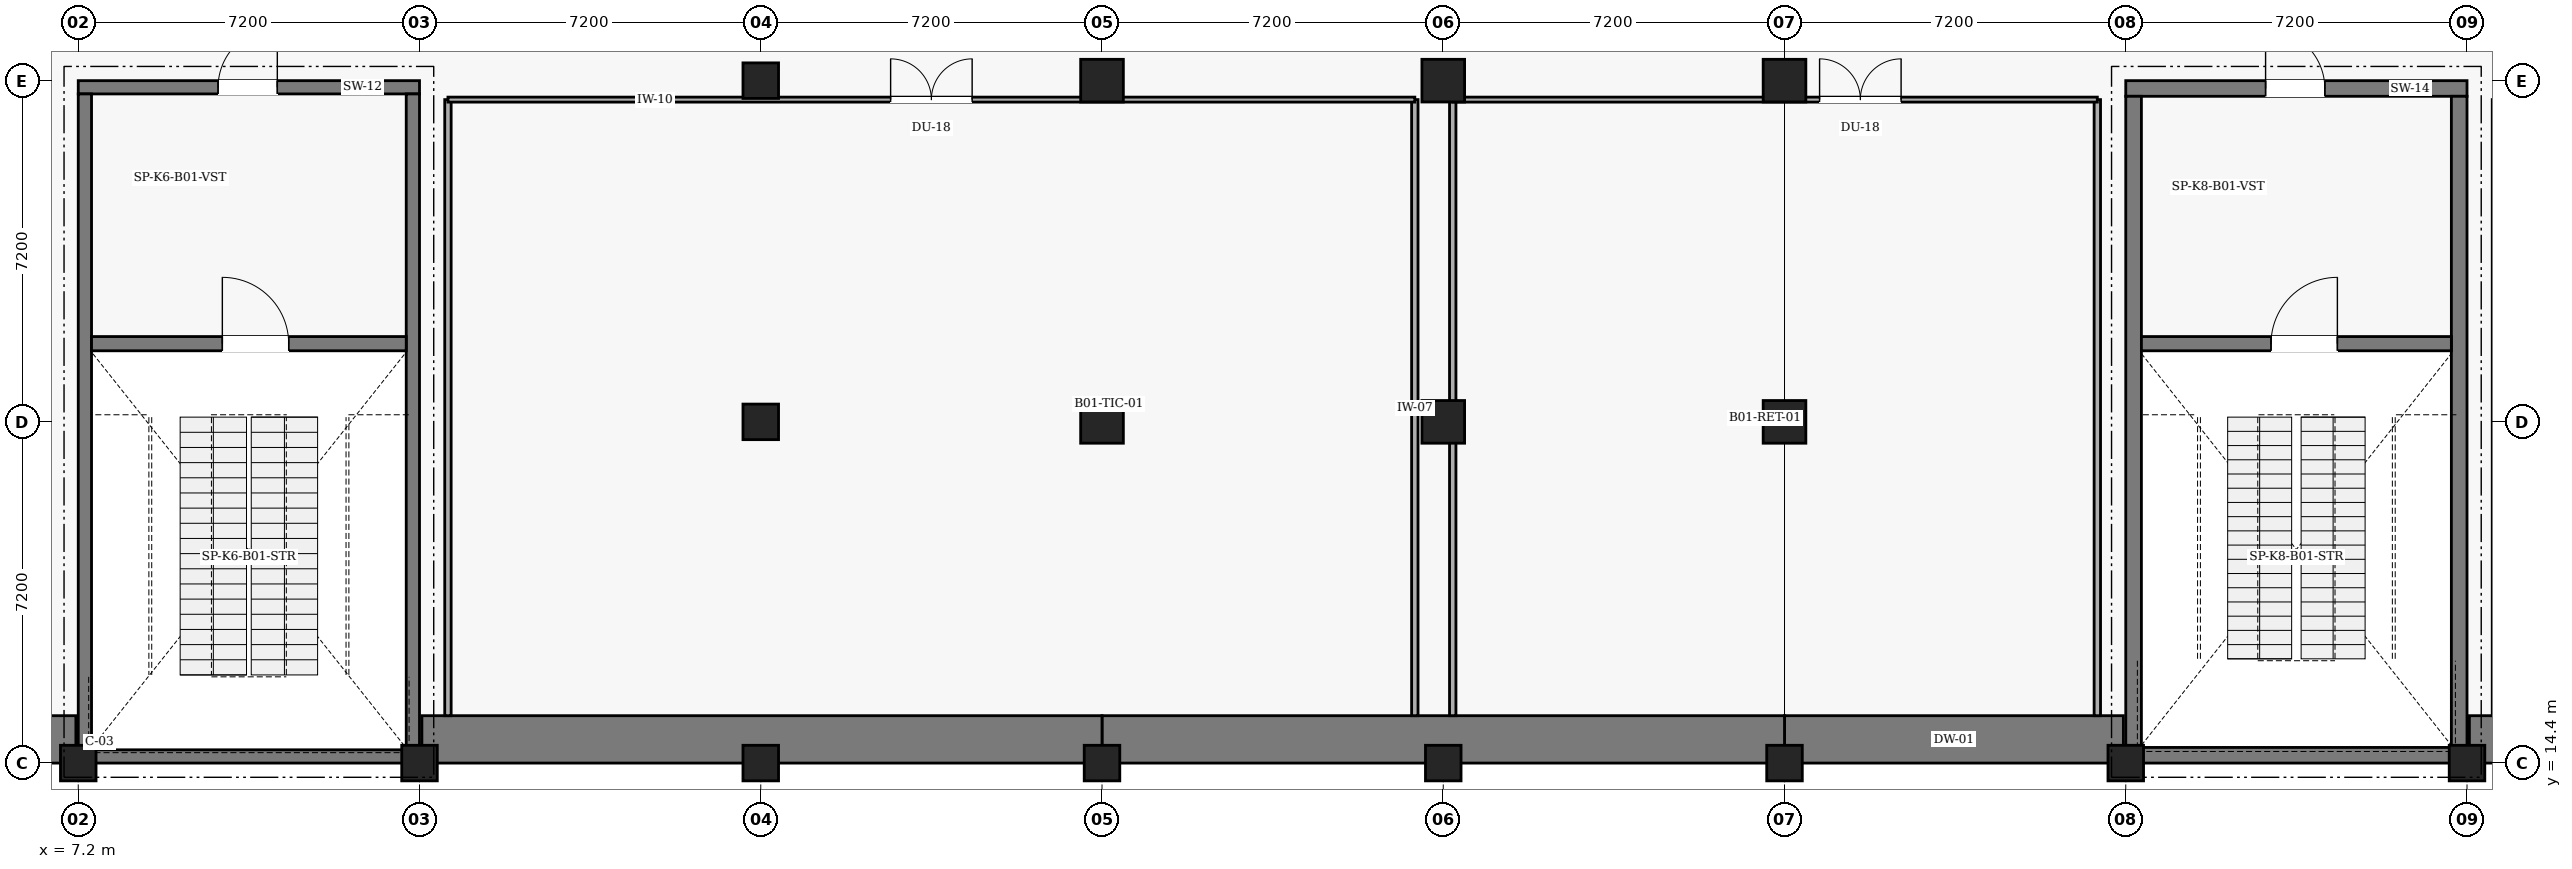
"""IFC4 building model, lengths in metres.
Left out: names, types, materials, properties, quantities, classifications, styles, units other than length and angle.
Written with IfcOpenShell. Run it as: python <this file> out.ifc"""

import sys

from ifc_helpers import new_model, si_unit, direction, frame, frame_2d, origin, origin_2d, place, context, subcontext, project, spatial, rectangle, circle, extrude, element, fill, save


model = new_model("IFC4")
c1 = context("Model", 3, precision=1e-05, world=origin(), true_north=direction((0.0, 1.0)))
c2 = subcontext(c1, "Body", "Model", "MODEL_VIEW")
j1 = project(units=[si_unit("LENGTHUNIT", "METRE"), si_unit("PLANEANGLEUNIT", "RADIAN")], contexts=[c1])
p1 = place(None, origin())
s1 = spatial("IfcSite", under=j1, at=p1, CompositionType="ELEMENT")
p2 = place(p1, origin())
s2 = spatial("IfcBuilding", under=s1, at=p2, CompositionType="ELEMENT")
p3 = place(p2, frame((0.0, 0.0, -5.4)))
s3 = spatial("IfcBuildingStorey", under=s2, at=p3, CompositionType="ELEMENT", Elevation=-5.4)
p4 = place(p3, frame((72.0, 14.9, 0.0), z_axis=(0.0, 0.0, 1.0), x_axis=(-1.0, 0.0, 0.0)))
e1 = element("IfcWall", 1, at=p4, inside=s3, PredefinedType="USERDEFINED", context=c2, shape_type="SweptSolid", body=[
    extrude(rectangle(XDim=14.35, YDim=1.0, at=frame_2d((7.175, 0.0))), origin(), (0.0, 0.0, 1.0), 4.95),
])
p5 = place(p3, frame((50.35, 14.9, 0.0), z_axis=(0.0, 0.0, 1.0), x_axis=(-1.0, 0.0, 0.0)))
e2 = element("IfcWall", 2, at=p5, inside=s3, PredefinedType="USERDEFINED", context=c2, shape_type="SweptSolid", body=[
    extrude(rectangle(XDim=7.15, YDim=1.0, at=frame_2d((3.575, 0.0))), origin(), (0.0, 0.0, 1.0), 4.95),
])
p6 = place(p3, frame((43.2, 14.9, 0.0), z_axis=(0.0, 0.0, 1.0), x_axis=(-1.0, 0.0, 0.0)))
e3 = element("IfcWall", 3, at=p6, inside=s3, PredefinedType="USERDEFINED", context=c2, shape_type="SweptSolid", body=[
    extrude(rectangle(XDim=14.4, YDim=1.0, at=frame_2d((7.2, 0.0))), origin(), (0.0, 0.0, 1.0), 4.95),
])
p7 = place(p3, frame((28.8, 14.9, 0.0), z_axis=(0.0, 0.0, 1.0), x_axis=(-1.0, 0.0, 0.0)))
e4 = element("IfcWall", 4, at=p7, inside=s3, PredefinedType="USERDEFINED", context=c2, shape_type="SweptSolid", body=[
    extrude(rectangle(XDim=14.35, YDim=1.0, at=frame_2d((7.175, 0.0))), origin(), (0.0, 0.0, 1.0), 4.95),
])
p8 = place(p3, frame((7.15, 14.9, 0.0), z_axis=(0.0, 0.0, 1.0), x_axis=(-1.0, 0.0, 0.0)))
e5 = element("IfcWall", 5, at=p8, inside=s3, PredefinedType="USERDEFINED", context=c2, shape_type="SweptSolid", body=[
    extrude(rectangle(XDim=7.15, YDim=1.0, at=frame_2d((3.575, 0.0))), origin(), (0.0, 0.0, 1.0), 4.95),
])
p9 = place(p3, frame((7.2, 28.66, 0.0), z_axis=(0.0, 0.0, 1.0), x_axis=(1.0, 0.0, 0.0)))
e6 = element("IfcWall", 6, at=p9, inside=s3, PredefinedType="SHEAR", context=c2, shape_type="SweptSolid", body=[
    extrude(rectangle(XDim=7.2, YDim=0.28, at=frame_2d((3.6, 0.0))), origin(), (0.0, 0.0, 1.0), 5.4),
])
p10 = place(p9, frame((2.95, 0.0, 0.0)))
e7 = element("IfcOpeningElement", 7, at=p10, cuts=e6, PredefinedType="OPENING", context=c2, shape_type="SweptSolid", body=[
    extrude(rectangle(XDim=1.25, YDim=2.2, at=frame_2d((0.625, 1.1))), frame((0.0, 0.15, 0.0), z_axis=(0.0, -1.0, 0.0), x_axis=(1.0, 0.0, 0.0)), (0.0, 0.0, 1.0), 0.3),
])
p11 = place(p3, frame((14.26, 28.52, 0.0), z_axis=(0.0, 0.0, 1.0), x_axis=(0.0, -1.0, 0.0)))
e8 = element("IfcWall", 8, at=p11, inside=s3, PredefinedType="SHEAR", context=c2, shape_type="SweptSolid", body=[
    extrude(rectangle(XDim=13.84, YDim=0.28, at=frame_2d((6.92, 0.0))), origin(), (0.0, 0.0, 1.0), 5.4),
])
p12 = place(p3, frame((14.4, 14.54, 0.0), z_axis=(0.0, 0.0, 1.0), x_axis=(-1.0, 0.0, 0.0)))
e9 = element("IfcWall", 9, at=p12, inside=s3, PredefinedType="SHEAR", context=c2, shape_type="SweptSolid", body=[
    extrude(rectangle(XDim=7.2, YDim=0.28, at=frame_2d((3.6, 0.0))), origin(), (0.0, 0.0, 1.0), 5.4),
])
p13 = place(p3, frame((7.34, 14.68, 0.0), z_axis=(0.0, 0.0, 1.0), x_axis=(0.0, 1.0, 0.0)))
e10 = element("IfcWall", 10, at=p13, inside=s3, PredefinedType="SHEAR", context=c2, shape_type="SweptSolid", body=[
    extrude(rectangle(XDim=13.84, YDim=0.28, at=frame_2d((6.92, 0.0))), origin(), (0.0, 0.0, 1.0), 5.4),
])
p14 = place(p3, frame((7.48, 23.25, 0.0), z_axis=(0.0, 0.0, 1.0), x_axis=(1.0, 0.0, 0.0)))
e11 = element("IfcWall", 11, at=p14, inside=s3, PredefinedType="SHEAR", context=c2, shape_type="SweptSolid", body=[
    extrude(rectangle(XDim=6.64, YDim=0.3, at=frame_2d((3.32, 0.0))), origin(), (0.0, 0.0, 1.0), 5.4),
])
p15 = place(p14, frame((2.76, 0.0, 0.0)))
e12 = element("IfcOpeningElement", 12, at=p15, cuts=e11, PredefinedType="OPENING", context=c2, shape_type="SweptSolid", body=[
    extrude(rectangle(XDim=1.4, YDim=2.2, at=frame_2d((0.7, 1.1))), frame((0.0, 0.16, 0.0), z_axis=(0.0, -1.0, 0.0), x_axis=(1.0, 0.0, 0.0)), (0.0, 0.0, 1.0), 0.32),
])
p16 = place(p3, frame((50.4, 28.635, 0.0), z_axis=(0.0, 0.0, 1.0), x_axis=(1.0, 0.0, 0.0)))
e13 = element("IfcWall", 13, at=p16, inside=s3, PredefinedType="SHEAR", context=c2, shape_type="SweptSolid", body=[
    extrude(rectangle(XDim=7.2, YDim=0.33, at=frame_2d((3.6, 0.0))), origin(), (0.0, 0.0, 1.0), 5.4),
])
p17 = place(p16, frame((2.95, 0.0, 0.0)))
e14 = element("IfcOpeningElement", 14, at=p17, cuts=e13, PredefinedType="OPENING", context=c2, shape_type="SweptSolid", body=[
    extrude(rectangle(XDim=1.25, YDim=2.2, at=frame_2d((0.625, 1.1))), frame((0.0, 0.175, 0.0), z_axis=(0.0, -1.0, 0.0), x_axis=(1.0, 0.0, 0.0)), (0.0, 0.0, 1.0), 0.35),
])
p18 = place(p3, frame((57.435, 28.47, 0.0), z_axis=(0.0, 0.0, 1.0), x_axis=(0.0, -1.0, 0.0)))
e15 = element("IfcWall", 15, at=p18, inside=s3, PredefinedType="SHEAR", context=c2, shape_type="SweptSolid", body=[
    extrude(rectangle(XDim=13.74, YDim=0.33, at=frame_2d((6.87, 0.0))), origin(), (0.0, 0.0, 1.0), 5.4),
])
p19 = place(p3, frame((57.6, 14.565, 0.0), z_axis=(0.0, 0.0, 1.0), x_axis=(-1.0, 0.0, 0.0)))
e16 = element("IfcWall", 16, at=p19, inside=s3, PredefinedType="SHEAR", context=c2, shape_type="SweptSolid", body=[
    extrude(rectangle(XDim=7.2, YDim=0.33, at=frame_2d((3.6, 0.0))), origin(), (0.0, 0.0, 1.0), 5.4),
])
p20 = place(p3, frame((50.565, 14.73, 0.0), z_axis=(0.0, 0.0, 1.0), x_axis=(0.0, 1.0, 0.0)))
e17 = element("IfcWall", 17, at=p20, inside=s3, PredefinedType="SHEAR", context=c2, shape_type="SweptSolid", body=[
    extrude(rectangle(XDim=13.74, YDim=0.33, at=frame_2d((6.87, 0.0))), origin(), (0.0, 0.0, 1.0), 5.4),
])
p21 = place(p3, frame((50.73, 23.25, 0.0), z_axis=(0.0, 0.0, 1.0), x_axis=(1.0, 0.0, 0.0)))
e18 = element("IfcWall", 18, at=p21, inside=s3, PredefinedType="SHEAR", context=c2, shape_type="SweptSolid", body=[
    extrude(rectangle(XDim=6.54, YDim=0.3, at=frame_2d((3.27, 0.0))), origin(), (0.0, 0.0, 1.0), 5.4),
])
p22 = place(p21, frame((2.735, 0.0, 0.0)))
e19 = element("IfcOpeningElement", 19, at=p22, cuts=e18, PredefinedType="OPENING", context=c2, shape_type="SweptSolid", body=[
    extrude(rectangle(XDim=1.4, YDim=2.2, at=frame_2d((0.7, 1.1))), frame((0.0, 0.16, 0.0), z_axis=(0.0, -1.0, 0.0), x_axis=(1.0, 0.0, 0.0)), (0.0, 0.0, 1.0), 0.32),
])
for number, where, z_axis, x_axis in (
    (20, (7.2, 14.4, 0.0), (0.0, 0.0, 1.0), (1.0, 0.0, 0.0)),
    (21, (14.4, 14.4, 0.0), (0.0, 0.0, 1.0), (1.0, 0.0, 0.0)),
    (22, (21.6, 14.4, 0.0), (0.0, 0.0, 1.0), (1.0, 0.0, 0.0)),
    (23, (21.6, 21.6, 0.0), (0.0, 0.0, 1.0), (1.0, 0.0, 0.0)),
    (24, (21.6, 28.8, 0.0), (0.0, 0.0, 1.0), (1.0, 0.0, 0.0)),
    (25, (28.8, 14.4, 0.0), (0.0, 0.0, 1.0), (1.0, 0.0, 0.0)),
):
    element("IfcColumn", number, at=place(p3, frame(where, z_axis=z_axis, x_axis=x_axis)), inside=s3, PredefinedType="COLUMN", context=c2, shape_type="SweptSolid", body=[
        extrude(rectangle(XDim=0.75, YDim=0.75, at=origin_2d()), origin(), (0.0, 0.0, 1.0), 4.95),
    ])
for number, where, z_axis, x_axis in (
    (26, (28.8, 21.6, 0.0), (0.0, 0.0, 1.0), (1.0, 0.0, 0.0)),
    (27, (28.8, 28.8, 0.0), (0.0, 0.0, 1.0), (1.0, 0.0, 0.0)),
):
    element("IfcColumn", number, at=place(p3, frame(where, z_axis=z_axis, x_axis=x_axis)), inside=s3, PredefinedType="COLUMN", context=c2, shape_type="SweptSolid", body=[
        extrude(circle(Radius=0.45, at=origin_2d()), origin(), (0.0, 0.0, 1.0), 4.95),
    ])
p23 = place(p3, frame((36.0, 14.4, 0.0), z_axis=(0.0, 0.0, 1.0), x_axis=(1.0, 0.0, 0.0)))
e28 = element("IfcColumn", 28, at=p23, inside=s3, PredefinedType="COLUMN", context=c2, shape_type="SweptSolid", body=[
    extrude(rectangle(XDim=0.75, YDim=0.75, at=origin_2d()), origin(), (0.0, 0.0, 1.0), 4.95),
])
for number, where, z_axis, x_axis in (
    (29, (36.0, 21.6, 0.0), (0.0, 0.0, 1.0), (1.0, 0.0, 0.0)),
    (30, (36.0, 28.8, 0.0), (0.0, 0.0, 1.0), (1.0, 0.0, 0.0)),
):
    element("IfcColumn", number, at=place(p3, frame(where, z_axis=z_axis, x_axis=x_axis)), inside=s3, PredefinedType="COLUMN", context=c2, shape_type="SweptSolid", body=[
        extrude(circle(Radius=0.45, at=origin_2d()), origin(), (0.0, 0.0, 1.0), 4.95),
    ])
p24 = place(p3, frame((43.2, 14.4, 0.0), z_axis=(0.0, 0.0, 1.0), x_axis=(1.0, 0.0, 0.0)))
e31 = element("IfcColumn", 31, at=p24, inside=s3, PredefinedType="COLUMN", context=c2, shape_type="SweptSolid", body=[
    extrude(rectangle(XDim=0.75, YDim=0.75, at=origin_2d()), origin(), (0.0, 0.0, 1.0), 4.95),
])
for number, where, z_axis, x_axis in (
    (32, (43.2, 21.6, 0.0), (0.0, 0.0, 1.0), (1.0, 0.0, 0.0)),
    (33, (43.2, 28.8, 0.0), (0.0, 0.0, 1.0), (1.0, 0.0, 0.0)),
):
    element("IfcColumn", number, at=place(p3, frame(where, z_axis=z_axis, x_axis=x_axis)), inside=s3, PredefinedType="COLUMN", context=c2, shape_type="SweptSolid", body=[
        extrude(circle(Radius=0.45, at=origin_2d()), origin(), (0.0, 0.0, 1.0), 4.95),
    ])
for number, where, z_axis, x_axis in (
    (34, (50.4, 14.4, 0.0), (0.0, 0.0, 1.0), (1.0, 0.0, 0.0)),
    (35, (57.6, 14.4, 0.0), (0.0, 0.0, 1.0), (1.0, 0.0, 0.0)),
):
    element("IfcColumn", number, at=place(p3, frame(where, z_axis=z_axis, x_axis=x_axis)), inside=s3, PredefinedType="COLUMN", context=c2, shape_type="SweptSolid", body=[
        extrude(rectangle(XDim=0.75, YDim=0.75, at=origin_2d()), origin(), (0.0, 0.0, 1.0), 4.95),
    ])
for number, where, z_axis, x_axis in (
    (36, (35.4, 28.4, 0.0), (0.0, 0.0, 1.0), (0.0, -1.0, 0.0)),
    (37, (15.0, 15.4, 0.0), (0.0, 0.0, 1.0), (0.0, 1.0, 0.0)),
):
    element("IfcWall", number, at=place(p3, frame(where, z_axis=z_axis, x_axis=x_axis)), inside=s3, PredefinedType="PARTITIONING", context=c2, shape_type="SweptSolid", body=[
        extrude(rectangle(XDim=13.0, YDim=0.135, at=frame_2d((6.5, 0.0))), origin(), (0.0, 0.0, 1.0), 4.05),
    ])
p25 = place(p3, frame((15.0, 28.4, 0.0), z_axis=(0.0, 0.0, 1.0), x_axis=(1.0, 0.0, 0.0)))
e38 = element("IfcWall", 38, at=p25, inside=s3, PredefinedType="PARTITIONING", context=c2, shape_type="SweptSolid", body=[
    extrude(rectangle(XDim=20.4, YDim=0.105, at=frame_2d((10.2, 0.0))), origin(), (0.0, 0.0, 1.0), 4.05),
])
p26 = place(p25, frame((9.34, 0.0, 0.0)))
e39 = element("IfcOpeningElement", 39, at=p26, cuts=e38, PredefinedType="OPENING", context=c2, shape_type="SweptSolid", body=[
    extrude(rectangle(XDim=1.72, YDim=2.22, at=frame_2d((0.86, 1.11))), frame((0.0, 0.062, 0.0), z_axis=(0.0, -1.0, 0.0), x_axis=(1.0, 0.0, 0.0)), (0.0, 0.0, 1.0), 0.125),
])
for number, where, z_axis, x_axis in (
    (40, (49.8, 28.4, 0.0), (0.0, 0.0, 1.0), (0.0, -1.0, 0.0)),
    (41, (36.2, 15.4, 0.0), (0.0, 0.0, 1.0), (0.0, 1.0, 0.0)),
):
    element("IfcWall", number, at=place(p3, frame(where, z_axis=z_axis, x_axis=x_axis)), inside=s3, PredefinedType="PARTITIONING", context=c2, shape_type="SweptSolid", body=[
        extrude(rectangle(XDim=13.0, YDim=0.135, at=frame_2d((6.5, 0.0))), origin(), (0.0, 0.0, 1.0), 4.05),
    ])
p27 = place(p3, frame((36.2, 28.4, 0.0), z_axis=(0.0, 0.0, 1.0), x_axis=(1.0, 0.0, 0.0)))
e42 = element("IfcWall", 42, at=p27, inside=s3, PredefinedType="PARTITIONING", context=c2, shape_type="SweptSolid", body=[
    extrude(rectangle(XDim=13.6, YDim=0.105, at=frame_2d((6.8, 0.0))), origin(), (0.0, 0.0, 1.0), 4.05),
])
p28 = place(p27, frame((7.74, 0.0, 0.0)))
e43 = element("IfcOpeningElement", 43, at=p28, cuts=e42, PredefinedType="OPENING", context=c2, shape_type="SweptSolid", body=[
    extrude(rectangle(XDim=1.72, YDim=2.22, at=frame_2d((0.86, 1.11))), frame((0.0, 0.062, 0.0), z_axis=(0.0, -1.0, 0.0), x_axis=(1.0, 0.0, 0.0)), (0.0, 0.0, 1.0), 0.125),
])
p29 = place(p3, frame((58.2, 15.4, 0.0), z_axis=(0.0, 0.0, 1.0), x_axis=(0.0, 1.0, 0.0)))
e44 = element("IfcWall", 44, at=p29, inside=s3, PredefinedType="PARTITIONING", context=c2, shape_type="SweptSolid", body=[
    extrude(rectangle(XDim=13.0, YDim=0.135, at=frame_2d((6.5, 0.0))), origin(), (0.0, 0.0, 1.0), 4.05),
])
p30 = place(p15, origin())
e45 = element("IfcDoor", 45, at=p30, inside=s3, OperationType="SINGLE_SWING_LEFT", PredefinedType="DOOR", context=c2, shape_type="SweptSolid", body=[
    extrude(rectangle(XDim=1.4, YDim=2.2, at=frame_2d((0.7, 1.1))), frame((0.0, 0.025, 0.0), z_axis=(0.0, -1.0, 0.0), x_axis=(1.0, 0.0, 0.0)), (0.0, 0.0, 1.0), 0.05),
])
fill(e12, e45)
p31 = place(p10, origin())
e46 = element("IfcDoor", 46, at=p31, inside=s3, OperationType="SINGLE_SWING_RIGHT", PredefinedType="DOOR", context=c2, shape_type="SweptSolid", body=[
    extrude(rectangle(XDim=1.25, YDim=2.2, at=frame_2d((0.625, 1.1))), frame((0.0, 0.025, 0.0), z_axis=(0.0, -1.0, 0.0), x_axis=(1.0, 0.0, 0.0)), (0.0, 0.0, 1.0), 0.05),
])
fill(e7, e46)
p32 = place(p22, origin())
e47 = element("IfcDoor", 47, at=p32, inside=s3, OperationType="SINGLE_SWING_RIGHT", PredefinedType="DOOR", context=c2, shape_type="SweptSolid", body=[
    extrude(rectangle(XDim=1.4, YDim=2.2, at=frame_2d((0.7, 1.1))), frame((0.0, 0.025, 0.0), z_axis=(0.0, -1.0, 0.0), x_axis=(1.0, 0.0, 0.0)), (0.0, 0.0, 1.0), 0.05),
])
fill(e19, e47)
p33 = place(p17, origin())
e48 = element("IfcDoor", 48, at=p33, inside=s3, OperationType="SINGLE_SWING_LEFT", PredefinedType="DOOR", context=c2, shape_type="SweptSolid", body=[
    extrude(rectangle(XDim=1.25, YDim=2.2, at=frame_2d((0.625, 1.1))), frame((0.0, 0.025, 0.0), z_axis=(0.0, -1.0, 0.0), x_axis=(1.0, 0.0, 0.0)), (0.0, 0.0, 1.0), 0.05),
])
fill(e14, e48)
p34 = place(p26, origin())
e49 = element("IfcDoor", 49, at=p34, inside=s3, OperationType="DOUBLE_DOOR_SINGLE_SWING", PredefinedType="DOOR", context=c2, shape_type="SweptSolid", body=[
    extrude(rectangle(XDim=1.72, YDim=2.22, at=frame_2d((0.86, 1.11))), frame((0.0, 0.025, 0.0), z_axis=(0.0, -1.0, 0.0), x_axis=(1.0, 0.0, 0.0)), (0.0, 0.0, 1.0), 0.05),
])
fill(e39, e49)
p35 = place(p28, origin())
e50 = element("IfcDoor", 50, at=p35, inside=s3, OperationType="DOUBLE_DOOR_SINGLE_SWING", PredefinedType="DOOR", context=c2, shape_type="SweptSolid", body=[
    extrude(rectangle(XDim=1.72, YDim=2.22, at=frame_2d((0.86, 1.11))), frame((0.0, 0.025, 0.0), z_axis=(0.0, -1.0, 0.0), x_axis=(1.0, 0.0, 0.0)), (0.0, 0.0, 1.0), 0.05),
])
fill(e43, e50)
save(model, sys.argv[1])
